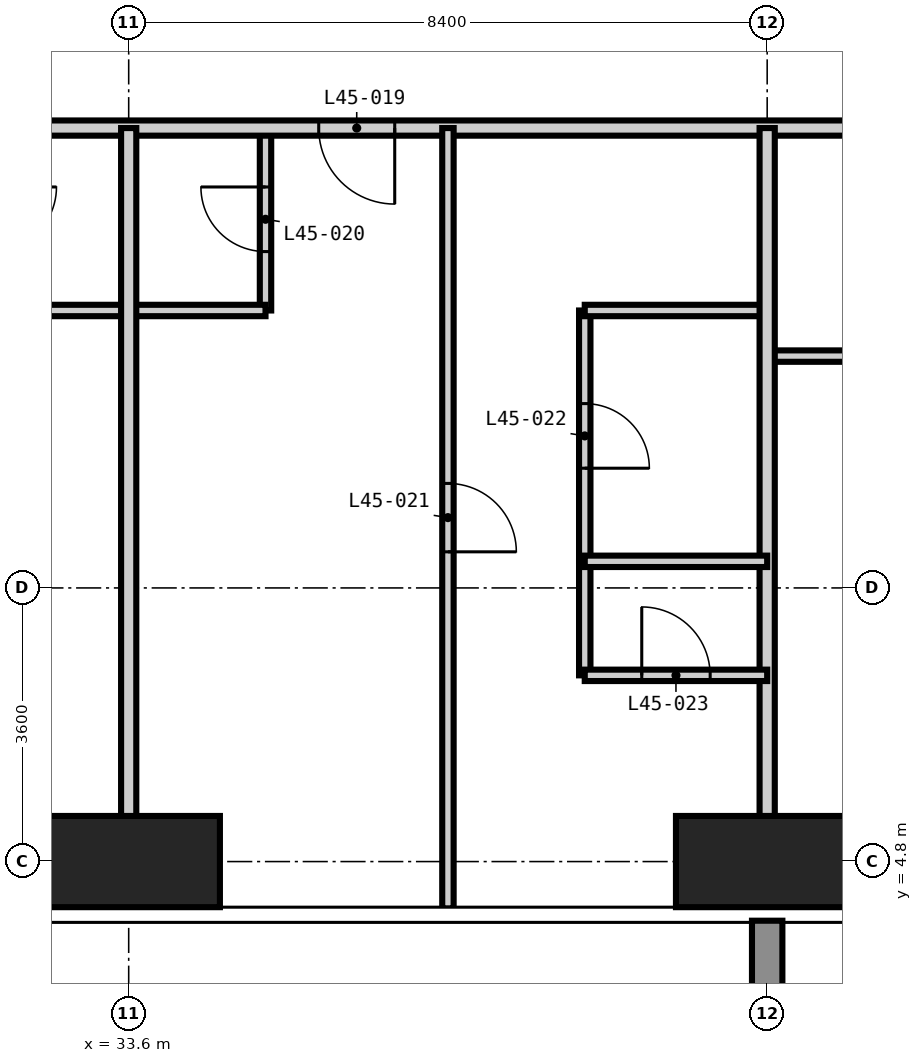
"""IFC4 building model, lengths in metres.
Left out: names, types, materials, properties, quantities, classifications, styles, units other than length and angle.
Written with IfcOpenShell. Run it as: python <this file> out.ifc"""

import sys

from ifc_helpers import new_model, si_unit, direction, frame, frame_2d, origin, origin_2d, place, context, subcontext, project, spatial, rectangle, extrude, element, fill, save


model = new_model("IFC4")
c1 = context("Model", 3, precision=1e-05, world=origin(), true_north=direction((0.0, 1.0)))
c2 = subcontext(c1, "Body", "Model", "MODEL_VIEW")
j1 = project(units=[si_unit("LENGTHUNIT", "METRE"), si_unit("PLANEANGLEUNIT", "RADIAN")], contexts=[c1])
p1 = place(None, origin())
s1 = spatial("IfcSite", under=j1, at=p1, CompositionType="ELEMENT")
p2 = place(p1, origin())
s2 = spatial("IfcBuilding", under=s1, at=p2, CompositionType="ELEMENT")
p3 = place(p2, frame((0.0, 0.0, 177.0)))
s3 = spatial("IfcBuildingStorey", under=s2, at=p3, CompositionType="ELEMENT", Elevation=177.0)
for number, where, z_axis, x_axis in (
    (1, (33.6, 4.8, -0.35), (0.0, 0.0, 1.0), (1.0, 0.0, 0.0)),
    (2, (42.0, 4.8, -0.35), (0.0, 0.0, 1.0), (1.0, 0.0, 0.0)),
):
    element("IfcColumn", number, at=place(p3, frame(where, z_axis=z_axis, x_axis=x_axis)), inside=s3, PredefinedType="COLUMN", context=c2, shape_type="SweptSolid", body=[
        extrude(rectangle(XDim=2.4, YDim=1.2, at=origin_2d()), origin(), (0.0, 0.0, 1.0), 3.6),
    ])
p4 = place(p3, frame((35.4, 12.05, 0.0), z_axis=(0.0, 0.0, 1.0), x_axis=(0.0, 1.0, 0.0)))
e3 = element("IfcWall", 3, at=p4, inside=s3, PredefinedType="PARTITIONING", context=c2, shape_type="SweptSolid", body=[
    extrude(rectangle(XDim=2.4, YDim=0.15, at=frame_2d((1.2, 0.0))), origin(), (0.0, 0.0, 1.0), 3.25),
])
p5 = place(p4, frame((0.775, 0.0, 0.0)))
e4 = element("IfcOpeningElement", 4, at=p5, cuts=e3, PredefinedType="OPENING", context=c2, shape_type="SweptSolid", body=[
    extrude(rectangle(XDim=0.85, YDim=2.1, at=frame_2d((0.425, 1.05))), frame((0.0, 0.085, 0.0), z_axis=(0.0, -1.0, 0.0), x_axis=(1.0, 0.0, 0.0)), (0.0, 0.0, 1.0), 0.17),
])
p6 = place(p3, frame((39.6, 8.75, 0.0), z_axis=(0.0, 0.0, 1.0), x_axis=(0.0, 1.0, 0.0)))
e5 = element("IfcWall", 5, at=p6, inside=s3, PredefinedType="PARTITIONING", context=c2, shape_type="SweptSolid", body=[
    extrude(rectangle(XDim=3.3, YDim=0.15, at=frame_2d((1.65, 0.0))), origin(), (0.0, 0.0, 1.0), 3.25),
])
p7 = place(p6, frame((1.225, 0.0, 0.0)))
e6 = element("IfcOpeningElement", 6, at=p7, cuts=e5, PredefinedType="OPENING", context=c2, shape_type="SweptSolid", body=[
    extrude(rectangle(XDim=0.85, YDim=2.1, at=frame_2d((0.425, 1.05))), frame((0.0, 0.085, 0.0), z_axis=(0.0, -1.0, 0.0), x_axis=(1.0, 0.0, 0.0)), (0.0, 0.0, 1.0), 0.17),
])
p8 = place(p3, frame((42.0, 11.45, 0.0), z_axis=(0.0, 0.0, 1.0), x_axis=(1.0, 0.0, 0.0)))
e7 = element("IfcWall", 7, at=p8, inside=s3, PredefinedType="PARTITIONING", context=c2, shape_type="SweptSolid", body=[
    extrude(rectangle(XDim=2.95, YDim=0.15, at=frame_2d((1.475, 0.0))), origin(), (0.0, 0.0, 1.0), 3.25),
])
p9 = place(p3, frame((31.8, 12.05, 0.0), z_axis=(0.0, 0.0, 1.0), x_axis=(1.0, 0.0, 0.0)))
e8 = element("IfcWall", 8, at=p9, inside=s3, PredefinedType="PARTITIONING", context=c2, shape_type="SweptSolid", body=[
    extrude(rectangle(XDim=3.6, YDim=0.15, at=frame_2d((1.8, 0.0))), origin(), (0.0, 0.0, 1.0), 3.25),
])
p10 = place(p3, frame((39.6, 12.05, 0.0), z_axis=(0.0, 0.0, 1.0), x_axis=(1.0, 0.0, 0.0)))
e9 = element("IfcWall", 9, at=p10, inside=s3, PredefinedType="PARTITIONING", context=c2, shape_type="SweptSolid", body=[
    extrude(rectangle(XDim=2.4, YDim=0.15, at=frame_2d((1.2, 0.0))), origin(), (0.0, 0.0, 1.0), 3.25),
])
p11 = place(p3, frame((44.95, 14.45, 0.0), z_axis=(0.0, 0.0, 1.0), x_axis=(-1.0, 0.0, 0.0)))
e10 = element("IfcWall", 10, at=p11, inside=s3, PredefinedType="PARTITIONING", context=c2, shape_type="SweptSolid", body=[
    extrude(rectangle(XDim=30.5, YDim=0.2, at=frame_2d((15.25, 0.0))), origin(), (0.0, 0.0, 1.0), 3.25),
])
p12 = place(p11, frame((24.65, 0.0, 0.0)))
e11 = element("IfcOpeningElement", 11, at=p12, cuts=e10, PredefinedType="OPENING", context=c2, shape_type="SweptSolid", body=[
    extrude(rectangle(XDim=1.0, YDim=2.2, at=frame_2d((0.5, 1.1))), frame((0.0, 0.11, 0.0), z_axis=(0.0, -1.0, 0.0), x_axis=(1.0, 0.0, 0.0)), (0.0, 0.0, 1.0), 0.22),
])
p13 = place(p11, frame((13.85, 0.0, 0.0)))
e12 = element("IfcOpeningElement", 12, at=p13, cuts=e10, PredefinedType="OPENING", context=c2, shape_type="SweptSolid", body=[
    extrude(rectangle(XDim=1.0, YDim=2.2, at=frame_2d((0.5, 1.1))), frame((0.0, 0.11, 0.0), z_axis=(0.0, -1.0, 0.0), x_axis=(1.0, 0.0, 0.0)), (0.0, 0.0, 1.0), 0.22),
])
p14 = place(p11, frame((7.85, 0.0, 0.0)))
e13 = element("IfcOpeningElement", 13, at=p14, cuts=e10, PredefinedType="OPENING", context=c2, shape_type="SweptSolid", body=[
    extrude(rectangle(XDim=1.0, YDim=2.2, at=frame_2d((0.5, 1.1))), frame((0.0, 0.11, 0.0), z_axis=(0.0, -1.0, 0.0), x_axis=(1.0, 0.0, 0.0)), (0.0, 0.0, 1.0), 0.22),
])
for number, where, z_axis, x_axis in (
    (14, (33.6, 4.182, 0.0), (0.0, 0.0, 1.0), (0.0, 1.0, 0.0)),
    (15, (42.0, 4.182, 0.0), (0.0, 0.0, 1.0), (0.0, 1.0, 0.0)),
):
    element("IfcWall", number, at=place(p3, frame(where, z_axis=z_axis, x_axis=x_axis)), inside=s3, PredefinedType="PARTITIONING", context=c2, shape_type="SweptSolid", body=[
        extrude(rectangle(XDim=10.268, YDim=0.2, at=frame_2d((5.134, 0.0))), origin(), (0.0, 0.0, 1.0), 3.25),
    ])
p15 = place(p3, frame((37.8, 4.182, 0.0), z_axis=(0.0, 0.0, 1.0), x_axis=(0.0, 1.0, 0.0)))
e16 = element("IfcWall", 16, at=p15, inside=s3, PredefinedType="PARTITIONING", context=c2, shape_type="SweptSolid", body=[
    extrude(rectangle(XDim=10.268, YDim=0.15, at=frame_2d((5.134, 0.0))), origin(), (0.0, 0.0, 1.0), 3.25),
])
p16 = place(p15, frame((4.693, 0.0, 0.0)))
e17 = element("IfcOpeningElement", 17, at=p16, cuts=e16, PredefinedType="OPENING", context=c2, shape_type="SweptSolid", body=[
    extrude(rectangle(XDim=0.9, YDim=2.1, at=frame_2d((0.45, 1.05))), frame((0.0, 0.085, 0.0), z_axis=(0.0, -1.0, 0.0), x_axis=(1.0, 0.0, 0.0)), (0.0, 0.0, 1.0), 0.17),
])
p17 = place(p3, frame((39.6, 7.25, 0.0), z_axis=(0.0, 0.0, 1.0), x_axis=(0.0, 1.0, 0.0)))
e18 = element("IfcWall", 18, at=p17, inside=s3, PredefinedType="PARTITIONING", context=c2, shape_type="SweptSolid", body=[
    extrude(rectangle(XDim=1.5, YDim=0.15, at=frame_2d((0.75, 0.0))), origin(), (0.0, 0.0, 1.0), 3.25),
])
p18 = place(p3, frame((39.6, 7.25, 0.0), z_axis=(0.0, 0.0, 1.0), x_axis=(1.0, 0.0, 0.0)))
e19 = element("IfcWall", 19, at=p18, inside=s3, PredefinedType="PARTITIONING", context=c2, shape_type="SweptSolid", body=[
    extrude(rectangle(XDim=2.4, YDim=0.15, at=frame_2d((1.2, 0.0))), origin(), (0.0, 0.0, 1.0), 3.25),
])
p19 = place(p18, frame((0.75, 0.0, 0.0)))
e20 = element("IfcOpeningElement", 20, at=p19, cuts=e19, PredefinedType="OPENING", context=c2, shape_type="SweptSolid", body=[
    extrude(rectangle(XDim=0.9, YDim=2.1, at=frame_2d((0.45, 1.05))), frame((0.0, 0.085, 0.0), z_axis=(0.0, -1.0, 0.0), x_axis=(1.0, 0.0, 0.0)), (0.0, 0.0, 1.0), 0.17),
])
p20 = place(p3, frame((39.6, 8.75, 0.0), z_axis=(0.0, 0.0, 1.0), x_axis=(1.0, 0.0, 0.0)))
e21 = element("IfcWall", 21, at=p20, inside=s3, PredefinedType="PARTITIONING", context=c2, shape_type="SweptSolid", body=[
    extrude(rectangle(XDim=2.4, YDim=0.15, at=frame_2d((1.2, 0.0))), origin(), (0.0, 0.0, 1.0), 3.25),
])
p21 = place(p14, origin())
e22 = element("IfcDoor", 22, at=p21, inside=s3, OperationType="SINGLE_SWING_LEFT", PredefinedType="DOOR", context=c2, shape_type="SweptSolid", body=[
    extrude(rectangle(XDim=1.0, YDim=2.2, at=frame_2d((0.5, 1.1))), frame((0.0, 0.025, 0.0), z_axis=(0.0, -1.0, 0.0), x_axis=(1.0, 0.0, 0.0)), (0.0, 0.0, 1.0), 0.05),
])
fill(e13, e22)
p22 = place(p5, origin())
e23 = element("IfcDoor", 23, at=p22, inside=s3, OperationType="SINGLE_SWING_RIGHT", PredefinedType="DOOR", context=c2, shape_type="SweptSolid", body=[
    extrude(rectangle(XDim=0.85, YDim=2.1, at=frame_2d((0.425, 1.05))), frame((0.0, 0.025, 0.0), z_axis=(0.0, -1.0, 0.0), x_axis=(1.0, 0.0, 0.0)), (0.0, 0.0, 1.0), 0.05),
])
fill(e4, e23)
p23 = place(p16, frame((0.9, 0.0, 0.0), z_axis=(0.0, 0.0, 1.0), x_axis=(-1.0, 0.0, 0.0)))
e24 = element("IfcDoor", 24, at=p23, inside=s3, OperationType="SINGLE_SWING_RIGHT", PredefinedType="DOOR", context=c2, shape_type="SweptSolid", body=[
    extrude(rectangle(XDim=0.9, YDim=2.1, at=frame_2d((0.45, 1.05))), frame((0.0, 0.025, 0.0), z_axis=(0.0, -1.0, 0.0), x_axis=(1.0, 0.0, 0.0)), (0.0, 0.0, 1.0), 0.05),
])
fill(e17, e24)
p24 = place(p7, frame((0.85, 0.0, 0.0), z_axis=(0.0, 0.0, 1.0), x_axis=(-1.0, 0.0, 0.0)))
e25 = element("IfcDoor", 25, at=p24, inside=s3, OperationType="SINGLE_SWING_RIGHT", PredefinedType="DOOR", context=c2, shape_type="SweptSolid", body=[
    extrude(rectangle(XDim=0.85, YDim=2.1, at=frame_2d((0.425, 1.05))), frame((0.0, 0.025, 0.0), z_axis=(0.0, -1.0, 0.0), x_axis=(1.0, 0.0, 0.0)), (0.0, 0.0, 1.0), 0.05),
])
fill(e6, e25)
p25 = place(p19, origin())
e26 = element("IfcDoor", 26, at=p25, inside=s3, OperationType="SINGLE_SWING_LEFT", PredefinedType="DOOR", context=c2, shape_type="SweptSolid", body=[
    extrude(rectangle(XDim=0.9, YDim=2.1, at=frame_2d((0.45, 1.05))), frame((0.0, 0.025, 0.0), z_axis=(0.0, -1.0, 0.0), x_axis=(1.0, 0.0, 0.0)), (0.0, 0.0, 1.0), 0.05),
])
fill(e20, e26)
save(model, sys.argv[1])
